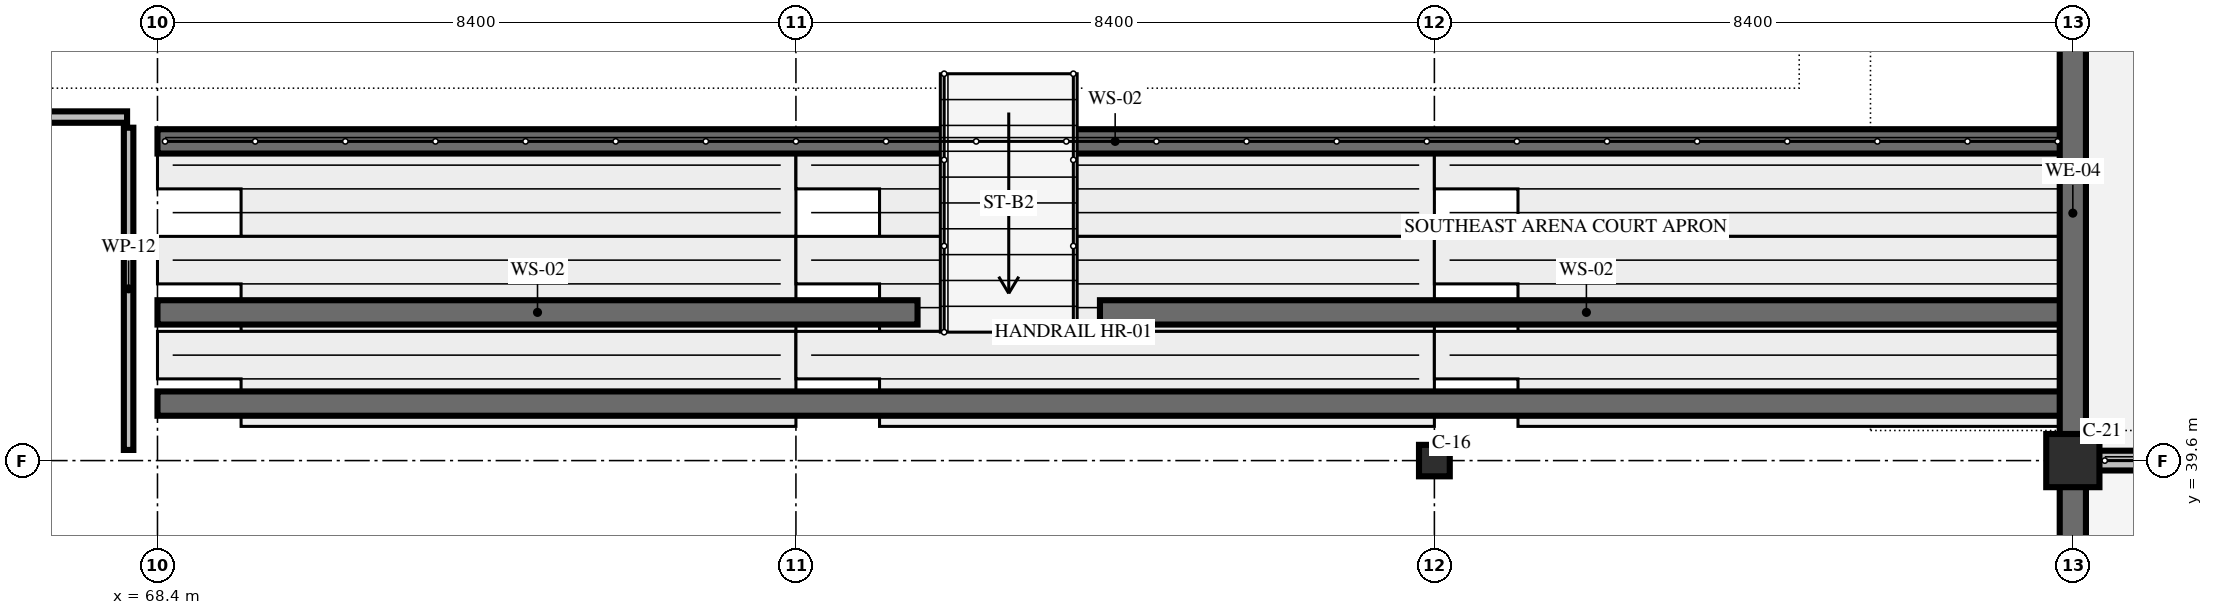
"""IFC4 building model, lengths in metres.
Left out: names, types, materials, properties, quantities, classifications, styles, units other than length and angle.
Written with IfcOpenShell. Run it as: python <this file> out.ifc"""

import sys

from ifc_helpers import new_model, si_unit, direction, frame, frame_2d, origin, origin_2d, place, context, subcontext, project, spatial, polyline, rectangle, hollow_rectangle, i_section, outline, extrude, element, save


model = new_model("IFC4")
c1 = context("Model", 3, precision=1e-05, world=origin(), true_north=direction((0.0, 1.0)))
c2 = subcontext(c1, "Body", "Model", "MODEL_VIEW")
j1 = project(units=[si_unit("LENGTHUNIT", "METRE"), si_unit("PLANEANGLEUNIT", "RADIAN")], contexts=[c1])
p1 = place(None, origin())
s1 = spatial("IfcSite", under=j1, at=p1, CompositionType="ELEMENT")
p2 = place(p1, origin())
s2 = spatial("IfcBuilding", under=s1, at=p2, CompositionType="ELEMENT")
p3 = place(p2, frame((0.0, 0.0, 10.8)))
s3 = spatial("IfcBuildingStorey", under=s2, at=p3, CompositionType="ELEMENT", Elevation=10.8)
p4 = place(p3, frame((85.2, 39.6, 0.0), z_axis=(0.0, 0.0, 1.0), x_axis=(1.0, 0.0, 0.0)))
e1 = element("IfcColumn", 1, at=p4, inside=s3, PredefinedType="COLUMN", context=c2, shape_type="SweptSolid", body=[
    extrude(i_section(OverallWidth=0.405, OverallDepth=0.414, WebThickness=0.018, FlangeThickness=0.028, FilletRadius=0.022, at=origin_2d()), origin(), (0.0, 0.0, 1.0), 6.0),
])
p5 = place(p3, frame((93.6, 39.6, 0.0), z_axis=(0.0, 0.0, 1.0), x_axis=(1.0, 0.0, 0.0)))
e2 = element("IfcColumn", 2, at=p5, inside=s3, PredefinedType="COLUMN", context=c2, shape_type="SweptSolid", body=[
    extrude(hollow_rectangle(XDim=0.7, YDim=0.7, WallThickness=0.028, InnerFilletRadius=0.028, OuterFilletRadius=0.056, at=origin_2d()), origin(), (0.0, 0.0, 1.0), 6.0),
])
p6 = place(p3, frame((68.4, 41.55, 0.0), z_axis=(0.0, 0.0, 1.0), x_axis=(1.0, 0.0, 0.0)))
e3 = element("IfcWall", 3, at=p6, inside=s3, PredefinedType="SOLIDWALL", context=c2, shape_type="SweptSolid", body=[
    extrude(rectangle(XDim=10.0, YDim=0.32, at=frame_2d((5.0, 0.0))), origin(), (0.0, 0.0, 1.0), 1.065),
])
p7 = place(p3, frame((80.8, 41.55, 0.0), z_axis=(0.0, 0.0, 1.0), x_axis=(1.0, 0.0, 0.0)))
e4 = element("IfcWall", 4, at=p7, inside=s3, PredefinedType="SOLIDWALL", context=c2, shape_type="SweptSolid", body=[
    extrude(rectangle(XDim=12.8, YDim=0.32, at=frame_2d((6.4, 0.0))), origin(), (0.0, 0.0, 1.0), 1.065),
])
p8 = place(p3, frame((68.4, 43.8, 0.0), z_axis=(0.0, 0.0, 1.0), x_axis=(1.0, 0.0, 0.0)))
e5 = element("IfcWall", 5, at=p8, inside=s3, PredefinedType="SOLIDWALL", context=c2, shape_type="SweptSolid", body=[
    extrude(rectangle(XDim=25.2, YDim=0.32, at=frame_2d((12.6, 0.0))), origin(), (0.0, 0.0, 1.0), 0.88),
])
p9 = place(p3, frame((68.4, 40.35, 0.0), z_axis=(0.0, 0.0, 1.0), x_axis=(1.0, 0.0, 0.0)))
e6 = element("IfcWall", 6, at=p9, inside=s3, PredefinedType="SOLIDWALL", context=c2, shape_type="SweptSolid", body=[
    extrude(rectangle(XDim=25.2, YDim=0.32, at=frame_2d((12.6, 0.0))), origin(), (0.0, 0.0, 1.0), 1.58),
])
p10 = place(p3, frame((93.6, 45.766, 0.0), z_axis=(0.0, 0.0, 1.0), x_axis=(0.0, -1.0, 0.0)))
e7 = element("IfcWall", 7, at=p10, inside=s3, PredefinedType="SOLIDWALL", context=c2, shape_type="SweptSolid", body=[
    extrude(rectangle(XDim=5.82, YDim=0.345, at=frame_2d((2.91, 0.0))), origin(), (0.0, 0.0, 1.0), 4.956),
])
p11 = place(p3, frame((93.6, 39.254, 0.0), z_axis=(0.0, 0.0, 1.0), x_axis=(0.0, -1.0, 0.0)))
e8 = element("IfcWall", 8, at=p11, inside=s3, PredefinedType="SOLIDWALL", context=c2, shape_type="SweptSolid", body=[
    extrude(rectangle(XDim=7.683, YDim=0.345, at=frame_2d((3.841, 0.0))), origin(), (0.0, 0.0, 1.0), 4.898),
])
p12 = place(p3, frame((105.8, 39.6, 0.0), z_axis=(0.0, 0.0, 1.0), x_axis=(-1.0, 0.0, 0.0)))
e9 = element("IfcWall", 9, at=p12, inside=s3, PredefinedType="SOLIDWALL", context=c2, shape_type="SweptSolid", body=[
    extrude(outline(polyline([(0.0, 0.0), (12.2, 0.0), (12.2, 0.02), (0.0, 1.82), (0.0, 0.0)])), frame((0.0, 0.13, 0.0), z_axis=(0.0, -1.0, 0.0), x_axis=(1.0, 0.0, 0.0)), (0.0, 0.0, 1.0), 0.26),
])
p13 = place(p3, frame((68.0, 44.12, 0.0), z_axis=(0.0, 0.0, 1.0), x_axis=(-1.0, 0.0, 0.0)))
e10 = element("IfcWall", 10, at=p13, inside=s3, PredefinedType="PARTITIONING", context=c2, shape_type="SweptSolid", body=[
    extrude(rectangle(XDim=7.6, YDim=0.15, at=frame_2d((3.8, 0.0))), origin(), (0.0, 0.0, 1.0), 5.65),
])
p14 = place(p3, frame((68.02, 39.74, 0.0), z_axis=(0.0, 0.0, 1.0), x_axis=(0.0, 1.0, 0.0)))
e11 = element("IfcWall", 11, at=p14, inside=s3, PredefinedType="PARTITIONING", context=c2, shape_type="SweptSolid", body=[
    extrude(rectangle(XDim=4.24, YDim=0.125, at=frame_2d((2.12, 0.0))), origin(), (0.0, 0.0, 1.0), 5.65),
])
save(model, sys.argv[1])
